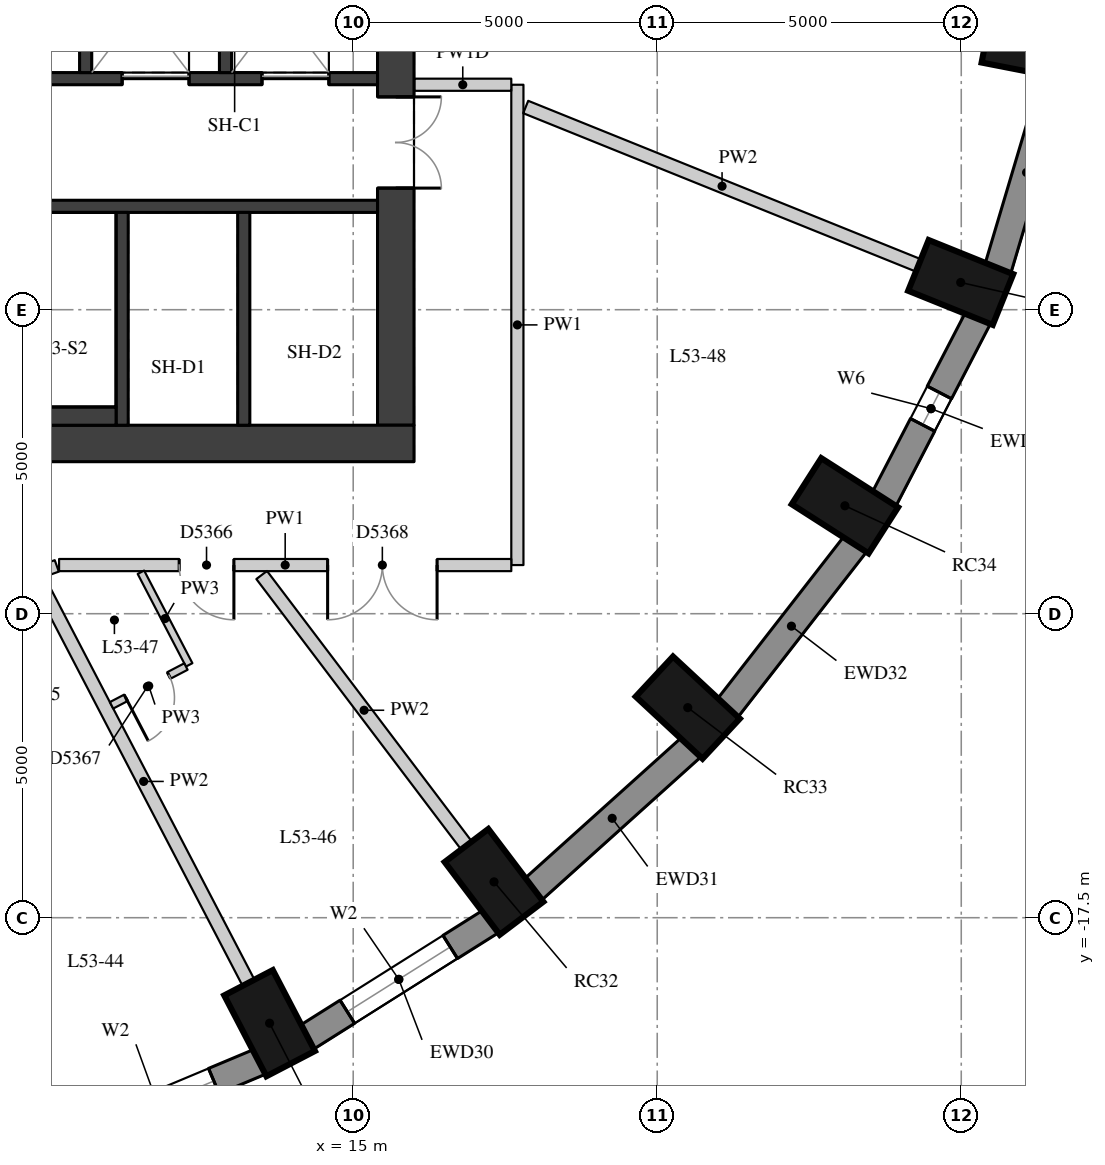
"""IFC4 building model, lengths in metres.
Left out: names, types, materials, properties, quantities, classifications, styles, units other than length and angle.
Written with IfcOpenShell. Run it as: python <this file> out.ifc"""

import sys

from ifc_helpers import new_model, si_unit, direction, frame, frame_2d, origin, origin_2d, place, context, subcontext, project, spatial, rectangle, extrude, element, fill, save


model = new_model("IFC4")
c1 = context("Model", 3, precision=1e-05, world=origin(), true_north=direction((0.0, 1.0)))
c2 = subcontext(c1, "Body", "Model", "MODEL_VIEW")
j1 = project(units=[si_unit("LENGTHUNIT", "METRE"), si_unit("PLANEANGLEUNIT", "RADIAN")], contexts=[c1])
p1 = place(None, origin())
s1 = spatial("IfcSite", under=j1, at=p1, CompositionType="ELEMENT")
p2 = place(p1, origin())
s2 = spatial("IfcBuilding", under=s1, at=p2, CompositionType="ELEMENT")
p3 = place(p2, frame((0.0, 0.0, 189.2)))
s3 = spatial("IfcBuildingStorey", under=s2, at=p3, CompositionType="ELEMENT", Elevation=189.2)
for number, where, z_axis, x_axis in (
    (1, (9.541, -20.948, 0.0), (0.0, 0.0, 1.0), (0.312, -0.95, 0.0)),
    (2, (13.625, -19.235, 0.0), (0.0, 0.0, 1.0), (0.462, -0.887, 0.0)),
    (3, (17.316, -16.911, 0.0), (0.0, 0.0, 1.0), (0.604, -0.797, 0.0)),
    (4, (20.502, -14.045, 0.0), (0.0, 0.0, 1.0), (0.732, -0.681, 0.0)),
    (5, (23.087, -10.725, 0.0), (0.0, 0.0, 1.0), (0.842, -0.539, 0.0)),
    (6, (24.991, -7.052, 0.0), (0.0, 0.0, 1.0), (0.927, -0.374, 0.0)),
    (7, (26.157, -3.137, 0.0), (0.0, 0.0, 1.0), (0.981, -0.192, 0.0)),
):
    element("IfcColumn", number, at=place(p3, frame(where, z_axis=z_axis, x_axis=x_axis)), inside=s3, PredefinedType="COLUMN", context=c2, shape_type="SweptSolid", body=[
        extrude(rectangle(XDim=1.5, YDim=0.9, at=origin_2d()), origin(), (0.0, 0.0, 1.0), 3.3),
    ])
p4 = place(p3, frame((10.103, -21.279, 0.0), z_axis=(0.0, 0.0, 1.0), x_axis=(0.922168222612, 0.386789050006, 0.0)))
e8 = element("IfcWall", 8, at=p4, inside=s3, PredefinedType="SOLIDWALL", context=c2, shape_type="SweptSolid", body=[
    extrude(rectangle(XDim=3.651, YDim=0.45, at=frame_2d((1.825, 0.0))), origin(), (0.0, 0.0, 1.0), 3.02),
])
p5 = place(p4, frame((0.825, 0.0, 0.4)))
e9 = element("IfcOpeningElement", 9, at=p5, cuts=e8, PredefinedType="OPENING", context=c2, shape_type="SweptSolid", body=[
    extrude(rectangle(XDim=2.0, YDim=1.75, at=frame_2d((1.0, 0.875))), frame((0.0, 0.235, 0.0), z_axis=(0.0, -1.0, 0.0), x_axis=(1.0, 0.0, 0.0)), (0.0, 0.0, 1.0), 0.47),
])
p6 = place(p3, frame((14.232, -19.47, 0.0), z_axis=(0.0, 0.0, 1.0), x_axis=(0.84614984472, 0.532945063098, 0.0)))
e10 = element("IfcWall", 10, at=p6, inside=s3, PredefinedType="SOLIDWALL", context=c2, shape_type="SweptSolid", body=[
    extrude(rectangle(XDim=3.586, YDim=0.45, at=frame_2d((1.793, 0.0))), origin(), (0.0, 0.0, 1.0), 3.02),
])
p7 = place(p6, frame((0.793, 0.0, 0.4)))
e11 = element("IfcOpeningElement", 11, at=p7, cuts=e10, PredefinedType="OPENING", context=c2, shape_type="SweptSolid", body=[
    extrude(rectangle(XDim=2.0, YDim=1.75, at=frame_2d((1.0, 0.875))), frame((0.0, 0.235, 0.0), z_axis=(0.0, -1.0, 0.0), x_axis=(1.0, 0.0, 0.0)), (0.0, 0.0, 1.0), 0.47),
])
p8 = place(p3, frame((17.953, -17.04, 0.0), z_axis=(0.0, 0.0, 1.0), x_axis=(0.743442727602, 0.668799604348, 0.0)))
e12 = element("IfcWall", 12, at=p8, inside=s3, PredefinedType="SOLIDWALL", context=c2, shape_type="SweptSolid", body=[
    extrude(rectangle(XDim=3.513, YDim=0.45, at=frame_2d((1.756, 0.0))), origin(), (0.0, 0.0, 1.0), 3.02),
])
p9 = place(p3, frame((21.151, -14.061, 0.0), z_axis=(0.0, 0.0, 1.0), x_axis=(0.614255239631, 0.789107407509, 0.0)))
e13 = element("IfcWall", 13, at=p9, inside=s3, PredefinedType="SOLIDWALL", context=c2, shape_type="SweptSolid", body=[
    extrude(rectangle(XDim=3.438, YDim=0.45, at=frame_2d((1.719, 0.0))), origin(), (0.0, 0.0, 1.0), 3.02),
])
p10 = place(p3, frame((23.727, -10.624, 0.0), z_axis=(0.0, 0.0, 1.0), x_axis=(0.460175500475, 0.887827972505, 0.0)))
e14 = element("IfcWall", 14, at=p10, inside=s3, PredefinedType="SOLIDWALL", context=c2, shape_type="SweptSolid", body=[
    extrude(rectangle(XDim=3.371, YDim=0.45, at=frame_2d((1.685, 0.0))), origin(), (0.0, 0.0, 1.0), 3.02),
])
p11 = place(p10, frame((1.385, 0.0, 0.4)))
e15 = element("IfcOpeningElement", 15, at=p11, cuts=e14, PredefinedType="OPENING", context=c2, shape_type="SweptSolid", body=[
    extrude(rectangle(XDim=0.6, YDim=1.75, at=frame_2d((0.3, 0.875))), frame((0.0, 0.235, 0.0), z_axis=(0.0, -1.0, 0.0), x_axis=(1.0, 0.0, 0.0)), (0.0, 0.0, 1.0), 0.47),
])
p12 = place(p3, frame((25.6, -6.834, 0.0), z_axis=(0.0, 0.0, 1.0), x_axis=(0.285444972963, 0.958395099847, 0.0)))
e16 = element("IfcWall", 16, at=p12, inside=s3, PredefinedType="SOLIDWALL", context=c2, shape_type="SweptSolid", body=[
    extrude(rectangle(XDim=3.32, YDim=0.45, at=frame_2d((1.66, 0.0))), origin(), (0.0, 0.0, 1.0), 3.02),
])
p13 = place(p3, frame((15.7, -9.4, 0.0), z_axis=(0.0, 0.0, 1.0), x_axis=(0.0, 1.0, 0.0)))
e17 = element("IfcWall", 17, at=p13, inside=s3, PredefinedType="SHEAR", context=c2, shape_type="SweptSolid", body=[
    extrude(rectangle(XDim=18.8, YDim=0.6, at=frame_2d((9.4, 0.0))), origin(), (0.0, 0.0, 1.0), 3.02),
])
p14 = place(p13, frame((13.4, 0.0, 0.0)))
e18 = element("IfcOpeningElement", 18, at=p14, cuts=e17, PredefinedType="OPENING", context=c2, shape_type="SweptSolid", body=[
    extrude(rectangle(XDim=1.5, YDim=2.1, at=frame_2d((0.75, 1.05))), frame((0.0, 0.31, 0.0), z_axis=(0.0, -1.0, 0.0), x_axis=(1.0, 0.0, 0.0)), (0.0, 0.0, 1.0), 0.62),
])
p15 = place(p13, frame((3.9, 0.0, 0.0)))
e19 = element("IfcOpeningElement", 19, at=p15, cuts=e17, PredefinedType="OPENING", context=c2, shape_type="SweptSolid", body=[
    extrude(rectangle(XDim=1.5, YDim=2.1, at=frame_2d((0.75, 1.05))), frame((0.0, 0.31, 0.0), z_axis=(0.0, -1.0, 0.0), x_axis=(1.0, 0.0, 0.0)), (0.0, 0.0, 1.0), 0.62),
])
p16 = place(p3, frame((4.0, -9.7, 0.0), z_axis=(0.0, 0.0, 1.0), x_axis=(1.0, 0.0, 0.0)))
e20 = element("IfcWall", 20, at=p16, inside=s3, PredefinedType="SHEAR", context=c2, shape_type="SweptSolid", body=[
    extrude(rectangle(XDim=12.0, YDim=0.6, at=frame_2d((6.0, 0.0))), origin(), (0.0, 0.0, 1.0), 3.02),
])
p17 = place(p3, frame((4.6, -3.7, 0.0), z_axis=(0.0, 0.0, 1.0), x_axis=(1.0, 0.0, 0.0)))
e21 = element("IfcWall", 21, at=p17, inside=s3, PredefinedType="SHEAR", context=c2, shape_type="SweptSolid", body=[
    extrude(rectangle(XDim=10.8, YDim=0.2, at=frame_2d((5.4, 0.0))), origin(), (0.0, 0.0, 1.0), 3.02),
])
p18 = place(p17, frame((6.6, 0.0, 0.0)))
e22 = element("IfcOpeningElement", 22, at=p18, cuts=e21, PredefinedType="OPENING", context=c2, shape_type="SweptSolid", body=[
    extrude(rectangle(XDim=1.1, YDim=2.1, at=frame_2d((0.55, 1.05))), frame((0.0, 0.11, 0.0), z_axis=(0.0, -1.0, 0.0), x_axis=(1.0, 0.0, 0.0)), (0.0, 0.0, 1.0), 0.22),
])
p19 = place(p17, frame((8.9, 0.0, 0.0)))
e23 = element("IfcOpeningElement", 23, at=p19, cuts=e21, PredefinedType="OPENING", context=c2, shape_type="SweptSolid", body=[
    extrude(rectangle(XDim=1.1, YDim=2.1, at=frame_2d((0.55, 1.05))), frame((0.0, 0.11, 0.0), z_axis=(0.0, -1.0, 0.0), x_axis=(1.0, 0.0, 0.0)), (0.0, 0.0, 1.0), 0.22),
])
p20 = place(p3, frame((4.6, -5.8, 0.0), z_axis=(0.0, 0.0, 1.0), x_axis=(1.0, 0.0, 0.0)))
e24 = element("IfcWall", 24, at=p20, inside=s3, PredefinedType="SHEAR", context=c2, shape_type="SweptSolid", body=[
    extrude(rectangle(XDim=10.8, YDim=0.2, at=frame_2d((5.4, 0.0))), origin(), (0.0, 0.0, 1.0), 3.02),
])
for number, where, z_axis, x_axis in (
    (25, (11.2, -9.4, 0.0), (0.0, 0.0, 1.0), (0.0, 1.0, 0.0)),
    (26, (13.2, -9.4, 0.0), (0.0, 0.0, 1.0), (0.0, 1.0, 0.0)),
):
    element("IfcWall", number, at=place(p3, frame(where, z_axis=z_axis, x_axis=x_axis)), inside=s3, PredefinedType="SHEAR", context=c2, shape_type="SweptSolid", body=[
        extrude(rectangle(XDim=3.5, YDim=0.2, at=frame_2d((1.75, 0.0))), origin(), (0.0, 0.0, 1.0), 3.02),
    ])
for number, where, z_axis, x_axis in (
    (27, (10.6, -3.6, 0.0), (0.0, 0.0, 1.0), (0.0, 1.0, 0.0)),
    (28, (12.9, -3.6, 0.0), (0.0, 0.0, 1.0), (0.0, 1.0, 0.0)),
):
    element("IfcWall", number, at=place(p3, frame(where, z_axis=z_axis, x_axis=x_axis)), inside=s3, PredefinedType="SHEAR", context=c2, shape_type="SweptSolid", body=[
        extrude(rectangle(XDim=2.5, YDim=0.2, at=frame_2d((1.25, 0.0))), origin(), (0.0, 0.0, 1.0), 3.02),
    ])
p21 = place(p3, frame((6.22, -9.25, 0.0), z_axis=(0.0, 0.0, 1.0), x_axis=(1.0, 0.0, 0.0)))
e29 = element("IfcWall", 29, at=p21, inside=s3, PredefinedType="PARTITIONING", context=c2, shape_type="SweptSolid", body=[
    extrude(rectangle(XDim=4.88, YDim=0.3, at=frame_2d((2.44, 0.0))), origin(), (0.0, 0.0, 1.0), 3.02),
])
p22 = place(p3, frame((17.7, -3.8, 0.0), z_axis=(0.0, 0.0, 1.0), x_axis=(0.0, -1.0, 0.0)))
e30 = element("IfcWall", 30, at=p22, inside=s3, PredefinedType="PARTITIONING", context=c2, shape_type="SweptSolid", body=[
    extrude(rectangle(XDim=7.9, YDim=0.2, at=frame_2d((3.95, 0.0))), origin(), (0.0, 0.0, 1.0), 3.02),
])
p23 = place(p3, frame((17.6, -11.7, 0.0), z_axis=(0.0, 0.0, 1.0), x_axis=(-1.0, 0.0, 0.0)))
e31 = element("IfcWall", 31, at=p23, inside=s3, PredefinedType="PARTITIONING", context=c2, shape_type="SweptSolid", body=[
    extrude(rectangle(XDim=7.437, YDim=0.2, at=frame_2d((3.719, 0.0))), origin(), (0.0, 0.0, 1.0), 3.02),
])
p24 = place(p23, frame((4.562, 0.0, 0.0)))
e32 = element("IfcOpeningElement", 32, at=p24, cuts=e31, PredefinedType="OPENING", context=c2, shape_type="SweptSolid", body=[
    extrude(rectangle(XDim=0.9, YDim=2.1, at=frame_2d((0.45, 1.05))), frame((0.0, 0.11, 0.0), z_axis=(0.0, -1.0, 0.0), x_axis=(1.0, 0.0, 0.0)), (0.0, 0.0, 1.0), 0.22),
])
p25 = place(p23, frame((1.22, 0.0, 0.0)))
e33 = element("IfcOpeningElement", 33, at=p25, cuts=e31, PredefinedType="OPENING", context=c2, shape_type="SweptSolid", body=[
    extrude(rectangle(XDim=1.8, YDim=2.1, at=frame_2d((0.9, 1.05))), frame((0.0, 0.11, 0.0), z_axis=(0.0, -1.0, 0.0), x_axis=(1.0, 0.0, 0.0)), (0.0, 0.0, 1.0), 0.22),
])
p26 = place(p3, frame((10.125, -11.714, 0.0), z_axis=(0.0, 0.0, 1.0), x_axis=(-0.940958661946, -0.338521486038, 0.0)))
e34 = element("IfcWall", 34, at=p26, inside=s3, PredefinedType="PARTITIONING", context=c2, shape_type="SweptSolid", body=[
    extrude(rectangle(XDim=6.594, YDim=0.2, at=frame_2d((3.297, 0.0))), origin(), (0.0, 0.0, 1.0), 3.02),
])
p27 = place(p26, frame((3.809, 0.0, 0.0)))
e35 = element("IfcOpeningElement", 35, at=p27, cuts=e34, PredefinedType="OPENING", context=c2, shape_type="SweptSolid", body=[
    extrude(rectangle(XDim=0.9, YDim=2.1, at=frame_2d((0.45, 1.05))), frame((0.0, 0.11, 0.0), z_axis=(0.0, -1.0, 0.0), x_axis=(1.0, 0.0, 0.0)), (0.0, 0.0, 1.0), 0.22),
])
p28 = place(p26, frame((0.706, 0.0, 0.0)))
e36 = element("IfcOpeningElement", 36, at=p28, cuts=e34, PredefinedType="OPENING", context=c2, shape_type="SweptSolid", body=[
    extrude(rectangle(XDim=0.9, YDim=2.1, at=frame_2d((0.45, 1.05))), frame((0.0, 0.11, 0.0), z_axis=(0.0, -1.0, 0.0), x_axis=(1.0, 0.0, 0.0)), (0.0, 0.0, 1.0), 0.22),
])
p29 = place(p3, frame((16.004, -3.8, 0.0), z_axis=(0.0, 0.0, 1.0), x_axis=(1.0, 0.0, 0.0)))
e37 = element("IfcWall", 37, at=p29, inside=s3, PredefinedType="PARTITIONING", context=c2, shape_type="SweptSolid", body=[
    extrude(rectangle(XDim=1.596, YDim=0.2, at=frame_2d((0.798, 0.0))), origin(), (0.0, 0.0, 1.0), 2.47),
])
p30 = place(p3, frame((13.279, -18.57, 0.0), z_axis=(0.0, 0.0, 1.0), x_axis=(-0.461996036885, 0.886881988712, 0.0)))
e38 = element("IfcWall", 38, at=p30, inside=s3, PredefinedType="PARTITIONING", context=c2, shape_type="SweptSolid", body=[
    extrude(rectangle(XDim=7.467, YDim=0.22, at=frame_2d((3.733, 0.0))), origin(), (0.0, 0.0, 1.0), 3.02),
])
p31 = place(p3, frame((16.863, -16.312, 0.0), z_axis=(0.0, 0.0, 1.0), x_axis=(-0.603626861738, 0.797266963939, 0.0)))
e39 = element("IfcWall", 39, at=p31, inside=s3, PredefinedType="PARTITIONING", context=c2, shape_type="SweptSolid", body=[
    extrude(rectangle(XDim=5.58, YDim=0.22, at=frame_2d((2.79, 0.0))), origin(), (0.0, 0.0, 1.0), 3.02),
])
p32 = place(p3, frame((24.295, -6.771, 0.0), z_axis=(0.0, 0.0, 1.0), x_axis=(-0.927387137769, 0.374103056256, 0.0)))
e40 = element("IfcWall", 40, at=p32, inside=s3, PredefinedType="PARTITIONING", context=c2, shape_type="SweptSolid", body=[
    extrude(rectangle(XDim=6.964, YDim=0.22, at=frame_2d((3.482, 0.0))), origin(), (0.0, 0.0, 1.0), 3.02),
])
p33 = place(p3, frame((11.509, -11.818, 0.0), z_axis=(0.0, 0.0, 1.0), x_axis=(0.461987980812, -0.886886185249, 0.0)))
e41 = element("IfcWall", 41, at=p33, inside=s3, PredefinedType="PARTITIONING", context=c2, shape_type="SweptSolid", body=[
    extrude(rectangle(XDim=1.718, YDim=0.12, at=frame_2d((0.859, 0.0))), origin(), (0.0, 0.0, 1.0), 3.02),
])
p34 = place(p3, frame((12.249, -13.369, 0.0), z_axis=(0.0, 0.0, 1.0), x_axis=(-0.886834011057, -0.462088126695, 0.0)))
e42 = element("IfcWall", 42, at=p34, inside=s3, PredefinedType="PARTITIONING", context=c2, shape_type="SweptSolid", body=[
    extrude(rectangle(XDim=1.379, YDim=0.12, at=frame_2d((0.69, 0.0))), origin(), (0.0, 0.0, 1.0), 3.02),
])
p35 = place(p34, frame((0.315, 0.0, 0.0)))
e43 = element("IfcOpeningElement", 43, at=p35, cuts=e42, PredefinedType="OPENING", context=c2, shape_type="SweptSolid", body=[
    extrude(rectangle(XDim=0.8, YDim=2.1, at=frame_2d((0.4, 1.05))), frame((0.0, 0.07, 0.0), z_axis=(0.0, -1.0, 0.0), x_axis=(1.0, 0.0, 0.0)), (0.0, 0.0, 1.0), 0.14),
])
p36 = place(p5, origin())
e44 = element("IfcWindow", 44, at=p36, inside=s3, PartitioningType="SINGLE_PANEL", PredefinedType="WINDOW", context=c2, shape_type="SweptSolid", body=[
    extrude(rectangle(XDim=2.0, YDim=1.75, at=frame_2d((1.0, 0.875))), frame((0.0, 0.035, 0.0), z_axis=(0.0, -1.0, 0.0), x_axis=(1.0, 0.0, 0.0)), (0.0, 0.0, 1.0), 0.06),
])
fill(e9, e44)
p37 = place(p7, origin())
e45 = element("IfcWindow", 45, at=p37, inside=s3, PartitioningType="SINGLE_PANEL", PredefinedType="WINDOW", context=c2, shape_type="SweptSolid", body=[
    extrude(rectangle(XDim=2.0, YDim=1.75, at=frame_2d((1.0, 0.875))), frame((0.0, 0.035, 0.0), z_axis=(0.0, -1.0, 0.0), x_axis=(1.0, 0.0, 0.0)), (0.0, 0.0, 1.0), 0.06),
])
fill(e11, e45)
p38 = place(p11, origin())
e46 = element("IfcWindow", 46, at=p38, inside=s3, PartitioningType="SINGLE_PANEL", PredefinedType="WINDOW", context=c2, shape_type="SweptSolid", body=[
    extrude(rectangle(XDim=0.6, YDim=1.75, at=frame_2d((0.3, 0.875))), frame((0.0, 0.035, 0.0), z_axis=(0.0, -1.0, 0.0), x_axis=(1.0, 0.0, 0.0)), (0.0, 0.0, 1.0), 0.06),
])
fill(e15, e46)
p39 = place(p15, origin())
e47 = element("IfcDoor", 47, at=p39, inside=s3, OperationType="DOUBLE_DOOR_SINGLE_SWING", PredefinedType="DOOR", context=c2, shape_type="SweptSolid", body=[
    extrude(rectangle(XDim=1.5, YDim=2.1, at=frame_2d((0.75, 1.05))), frame((0.0, 0.025, 0.0), z_axis=(0.0, -1.0, 0.0), x_axis=(1.0, 0.0, 0.0)), (0.0, 0.0, 1.0), 0.05),
])
fill(e19, e47)
p40 = place(p18, origin())
e48 = element("IfcDoor", 48, at=p40, inside=s3, OperationType="DOUBLE_DOOR_SLIDING", PredefinedType="DOOR", context=c2, shape_type="SweptSolid", body=[
    extrude(rectangle(XDim=1.1, YDim=2.1, at=frame_2d((0.55, 1.05))), frame((0.0, 0.025, 0.0), z_axis=(0.0, -1.0, 0.0), x_axis=(1.0, 0.0, 0.0)), (0.0, 0.0, 1.0), 0.05),
])
fill(e22, e48)
p41 = place(p19, origin())
e49 = element("IfcDoor", 49, at=p41, inside=s3, OperationType="DOUBLE_DOOR_SLIDING", PredefinedType="DOOR", context=c2, shape_type="SweptSolid", body=[
    extrude(rectangle(XDim=1.1, YDim=2.1, at=frame_2d((0.55, 1.05))), frame((0.0, 0.025, 0.0), z_axis=(0.0, -1.0, 0.0), x_axis=(1.0, 0.0, 0.0)), (0.0, 0.0, 1.0), 0.05),
])
fill(e23, e49)
p42 = place(p24, origin())
e50 = element("IfcDoor", 50, at=p42, inside=s3, OperationType="SINGLE_SWING_LEFT", PredefinedType="DOOR", context=c2, shape_type="SweptSolid", body=[
    extrude(rectangle(XDim=0.9, YDim=2.1, at=frame_2d((0.45, 1.05))), frame((0.0, 0.025, 0.0), z_axis=(0.0, -1.0, 0.0), x_axis=(1.0, 0.0, 0.0)), (0.0, 0.0, 1.0), 0.05),
])
fill(e32, e50)
p43 = place(p35, origin())
e51 = element("IfcDoor", 51, at=p43, inside=s3, OperationType="SINGLE_SWING_RIGHT", PredefinedType="DOOR", context=c2, shape_type="SweptSolid", body=[
    extrude(rectangle(XDim=0.8, YDim=2.1, at=frame_2d((0.4, 1.05))), frame((0.0, 0.025, 0.0), z_axis=(0.0, -1.0, 0.0), x_axis=(1.0, 0.0, 0.0)), (0.0, 0.0, 1.0), 0.05),
])
fill(e43, e51)
p44 = place(p25, origin())
e52 = element("IfcDoor", 52, at=p44, inside=s3, OperationType="DOUBLE_DOOR_SINGLE_SWING", PredefinedType="DOOR", context=c2, shape_type="SweptSolid", body=[
    extrude(rectangle(XDim=1.8, YDim=2.1, at=frame_2d((0.9, 1.05))), frame((0.0, 0.025, 0.0), z_axis=(0.0, -1.0, 0.0), x_axis=(1.0, 0.0, 0.0)), (0.0, 0.0, 1.0), 0.05),
])
fill(e33, e52)
save(model, sys.argv[1])
